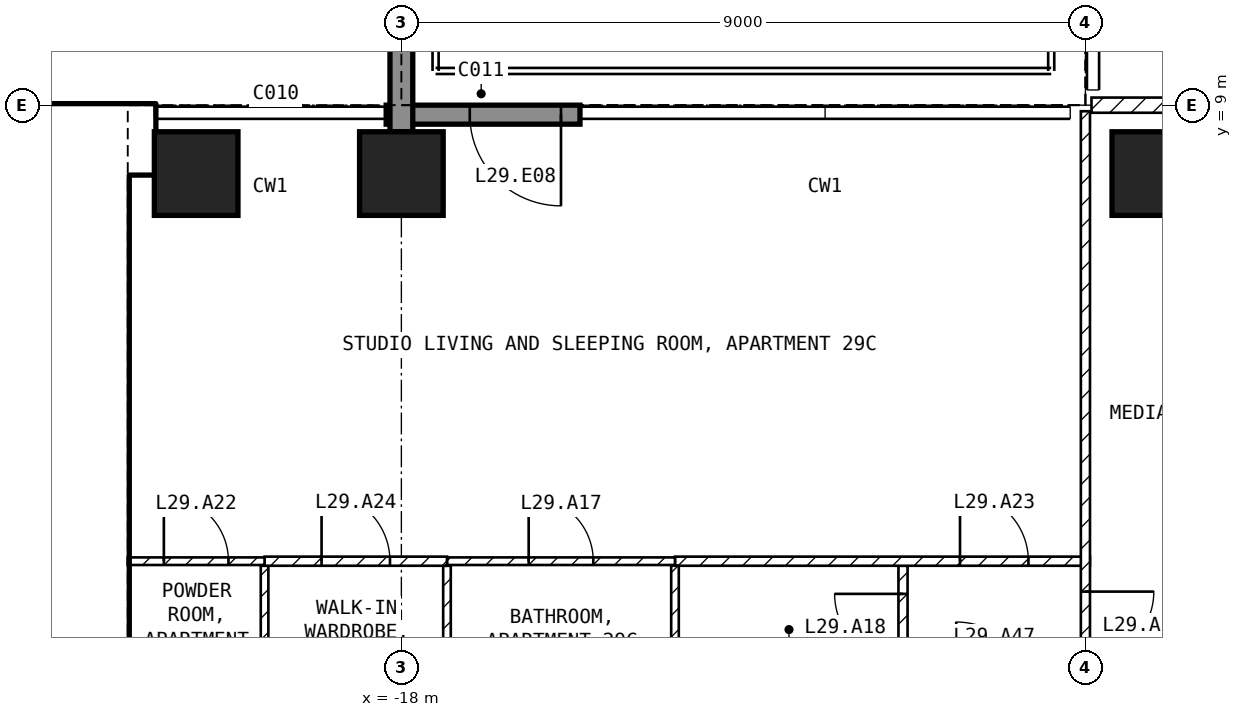
"""IFC4 building model, lengths in metres.
Left out: names, types, materials, properties, quantities, classifications, styles, units other than length and angle.
Written with IfcOpenShell. Run it as: python <this file> out.ifc"""

import sys

from ifc_helpers import new_model, si_unit, direction, frame, frame_2d, origin, origin_2d, place, context, subcontext, project, spatial, rectangle, extrude, element, fill, save


model = new_model("IFC4")
c1 = context("Model", 3, precision=1e-05, world=origin(), true_north=direction((0.0, 1.0)))
c2 = subcontext(c1, "Body", "Model", "MODEL_VIEW")
j1 = project(units=[si_unit("LENGTHUNIT", "METRE"), si_unit("PLANEANGLEUNIT", "RADIAN")], contexts=[c1])
p1 = place(None, origin())
s1 = spatial("IfcSite", under=j1, at=p1, CompositionType="ELEMENT")
p2 = place(p1, origin())
s2 = spatial("IfcBuilding", under=s1, at=p2, CompositionType="ELEMENT")
p3 = place(p2, frame((0.0, 0.0, 123.4)))
s3 = spatial("IfcBuildingStorey", under=s2, at=p3, CompositionType="ELEMENT", Elevation=123.4)
for number, where, z_axis, x_axis in (
    (1, (-20.7, 8.1, -0.25), (0.0, 0.0, 1.0), (1.0, 0.0, 0.0)),
    (2, (-18.0, 8.1, -0.25), (0.0, 0.0, 1.0), (1.0, 0.0, 0.0)),
    (3, (-8.1, 8.1, -0.25), (0.0, 0.0, 1.0), (1.0, 0.0, 0.0)),
):
    element("IfcColumn", number, at=place(p3, frame(where, z_axis=z_axis, x_axis=x_axis)), inside=s3, PredefinedType="COLUMN", context=c2, shape_type="SweptSolid", body=[
        extrude(rectangle(XDim=1.1, YDim=1.1, at=origin_2d()), origin(), (0.0, 0.0, 1.0), 3.5),
    ])
p4 = place(p3, frame((-15.65, 8.875, 0.0), z_axis=(0.0, 0.0, 1.0), x_axis=(-1.0, 0.0, 0.0)))
e4 = element("IfcWall", 4, at=p4, inside=s3, PredefinedType="SOLIDWALL", context=c2, shape_type="SweptSolid", body=[
    extrude(rectangle(XDim=2.55, YDim=0.25, at=frame_2d((1.275, 0.0))), origin(), (0.0, 0.0, 1.0), 3.25),
])
p5 = place(p4, frame((0.25, 0.0, 0.0)))
e5 = element("IfcOpeningElement", 5, at=p5, cuts=e4, PredefinedType="OPENING", context=c2, shape_type="SweptSolid", body=[
    extrude(rectangle(XDim=1.2, YDim=2.4, at=frame_2d((0.6, 1.2))), frame((0.0, 0.135, 0.0), z_axis=(0.0, -1.0, 0.0), x_axis=(1.0, 0.0, 0.0)), (0.0, 0.0, 1.0), 0.27),
])
p6 = place(p3, frame((-18.0, 8.65, 0.0), z_axis=(0.0, 0.0, 1.0), x_axis=(0.0, 1.0, 0.0)))
e6 = element("IfcWall", 6, at=p6, inside=s3, PredefinedType="SOLIDWALL", context=c2, shape_type="SweptSolid", body=[
    extrude(rectangle(XDim=3.09, YDim=0.3, at=frame_2d((1.545, 0.0))), origin(), (0.0, 0.0, 1.0), 3.25),
])
p7 = place(p3, frame((-29.45, 8.55, 0.0), z_axis=(0.0, 0.0, 1.0), x_axis=(1.0, 0.0, 0.0)))
e7 = element("IfcWall", 7, at=p7, inside=s3, PredefinedType="SHEAR", context=c2, shape_type="SweptSolid", body=[
    extrude(rectangle(XDim=8.2, YDim=0.9, at=frame_2d((4.1, 0.0))), origin(), (0.0, 0.0, 1.0), 3.25),
])
p8 = place(p3, frame((-21.825, 1.2, 0.0), z_axis=(0.0, 0.0, 1.0), x_axis=(0.0, 1.0, 0.0)))
e8 = element("IfcWall", 8, at=p8, inside=s3, PredefinedType="SHEAR", context=c2, shape_type="SweptSolid", body=[
    extrude(rectangle(XDim=6.9, YDim=0.45, at=frame_2d((3.45, 0.0))), origin(), (0.0, 0.0, 1.0), 3.25),
])
p9 = place(p3, frame((-28.35, 5.15, 0.0), z_axis=(0.0, 0.0, 1.0), x_axis=(1.0, 0.0, 0.0)))
e9 = element("IfcWall", 9, at=p9, inside=s3, PredefinedType="SOLIDWALL", context=c2, shape_type="SweptSolid", body=[
    extrude(rectangle(XDim=6.3, YDim=0.2, at=frame_2d((3.15, 0.0))), origin(), (0.0, 0.0, 1.0), 3.25),
])
p10 = place(p9, frame((5.1, 0.0, 0.0)))
e10 = element("IfcOpeningElement", 10, at=p10, cuts=e9, PredefinedType="OPENING", context=c2, shape_type="SweptSolid", body=[
    extrude(rectangle(XDim=1.0, YDim=2.1, at=frame_2d((0.5, 1.05))), frame((0.0, 0.11, 0.0), z_axis=(0.0, -1.0, 0.0), x_axis=(1.0, 0.0, 0.0)), (0.0, 0.0, 1.0), 0.22),
])
p11 = place(p3, frame((-8.92, 9.0, 0.0), z_axis=(0.0, 0.0, 1.0), x_axis=(1.0, 0.0, 0.0)))
e11 = element("IfcWall", 11, at=p11, inside=s3, PredefinedType="PARTITIONING", context=c2, shape_type="SweptSolid", body=[
    extrude(rectangle(XDim=17.84, YDim=0.2, at=frame_2d((8.92, 0.0))), origin(), (0.0, 0.0, 1.0), 3.25),
])
p12 = place(p11, frame((8.42, 0.0, 0.0)))
e12 = element("IfcOpeningElement", 12, at=p12, cuts=e11, PredefinedType="OPENING", context=c2, shape_type="SweptSolid", body=[
    extrude(rectangle(XDim=1.0, YDim=2.1, at=frame_2d((0.5, 1.05))), frame((0.0, 0.11, 0.0), z_axis=(0.0, -1.0, 0.0), x_axis=(1.0, 0.0, 0.0)), (0.0, 0.0, 1.0), 0.22),
])
p13 = place(p3, frame((-11.4, 1.3, 0.0), z_axis=(0.0, 0.0, 1.0), x_axis=(0.0, 1.0, 0.0)))
e13 = element("IfcWall", 13, at=p13, inside=s3, PredefinedType="PARTITIONING", context=c2, shape_type="SweptSolid", body=[
    extrude(rectangle(XDim=1.64, YDim=0.12, at=frame_2d((0.82, 0.0))), origin(), (0.0, 0.0, 1.0), 3.25),
])
p14 = place(p13, frame((0.37, 0.0, 0.0)))
e14 = element("IfcOpeningElement", 14, at=p14, cuts=e13, PredefinedType="OPENING", context=c2, shape_type="SweptSolid", body=[
    extrude(rectangle(XDim=0.9, YDim=2.1, at=frame_2d((0.45, 1.05))), frame((0.0, 0.07, 0.0), z_axis=(0.0, -1.0, 0.0), x_axis=(1.0, 0.0, 0.0)), (0.0, 0.0, 1.0), 0.14),
])
p15 = place(p3, frame((-14.4, 3.0, 0.0), z_axis=(0.0, 0.0, 1.0), x_axis=(1.0, 0.0, 0.0)))
e15 = element("IfcWall", 15, at=p15, inside=s3, PredefinedType="PARTITIONING", context=c2, shape_type="SweptSolid", body=[
    extrude(rectangle(XDim=5.46, YDim=0.12, at=frame_2d((2.73, 0.0))), origin(), (0.0, 0.0, 1.0), 3.25),
])
p16 = place(p15, frame((3.75, 0.0, 0.0)))
e16 = element("IfcOpeningElement", 16, at=p16, cuts=e15, PredefinedType="OPENING", context=c2, shape_type="SweptSolid", body=[
    extrude(rectangle(XDim=0.9, YDim=2.1, at=frame_2d((0.45, 1.05))), frame((0.0, 0.07, 0.0), z_axis=(0.0, -1.0, 0.0), x_axis=(1.0, 0.0, 0.0)), (0.0, 0.0, 1.0), 0.14),
])
p17 = place(p3, frame((-9.0, 8.92, 0.0), z_axis=(0.0, 0.0, 1.0), x_axis=(0.0, -1.0, 0.0)))
e17 = element("IfcWall", 17, at=p17, inside=s3, PredefinedType="PARTITIONING", context=c2, shape_type="SweptSolid", body=[
    extrude(rectangle(XDim=7.62, YDim=0.12, at=frame_2d((3.81, 0.0))), origin(), (0.0, 0.0, 1.0), 3.25),
])
p18 = place(p17, frame((6.32, 0.0, 0.0)))
e18 = element("IfcOpeningElement", 18, at=p18, cuts=e17, PredefinedType="OPENING", context=c2, shape_type="SweptSolid", body=[
    extrude(rectangle(XDim=0.9, YDim=2.1, at=frame_2d((0.45, 1.05))), frame((0.0, 0.07, 0.0), z_axis=(0.0, -1.0, 0.0), x_axis=(1.0, 0.0, 0.0)), (0.0, 0.0, 1.0), 0.14),
])
for number, where, z_axis, x_axis in (
    (19, (-14.4, 1.3, 0.0), (0.0, 0.0, 1.0), (0.0, 1.0, 0.0)),
    (20, (-17.4, 1.3, 0.0), (0.0, 0.0, 1.0), (0.0, 1.0, 0.0)),
):
    element("IfcWall", number, at=place(p3, frame(where, z_axis=z_axis, x_axis=x_axis)), inside=s3, PredefinedType="PARTITIONING", context=c2, shape_type="SweptSolid", body=[
        extrude(rectangle(XDim=1.64, YDim=0.1, at=frame_2d((0.82, 0.0))), origin(), (0.0, 0.0, 1.0), 3.25),
    ])
p19 = place(p3, frame((-17.4, 3.0, 0.0), z_axis=(0.0, 0.0, 1.0), x_axis=(1.0, 0.0, 0.0)))
e21 = element("IfcWall", 21, at=p19, inside=s3, PredefinedType="PARTITIONING", context=c2, shape_type="SweptSolid", body=[
    extrude(rectangle(XDim=3.0, YDim=0.1, at=frame_2d((1.5, 0.0))), origin(), (0.0, 0.0, 1.0), 3.25),
])
p20 = place(p19, frame((1.075, 0.0, 0.0)))
e22 = element("IfcOpeningElement", 22, at=p20, cuts=e21, PredefinedType="OPENING", context=c2, shape_type="SweptSolid", body=[
    extrude(rectangle(XDim=0.85, YDim=2.1, at=frame_2d((0.425, 1.05))), frame((0.0, 0.06, 0.0), z_axis=(0.0, -1.0, 0.0), x_axis=(1.0, 0.0, 0.0)), (0.0, 0.0, 1.0), 0.12),
])
p21 = place(p3, frame((-19.8, 1.3, 0.0), z_axis=(0.0, 0.0, 1.0), x_axis=(0.0, 1.0, 0.0)))
e23 = element("IfcWall", 23, at=p21, inside=s3, PredefinedType="PARTITIONING", context=c2, shape_type="SweptSolid", body=[
    extrude(rectangle(XDim=1.64, YDim=0.1, at=frame_2d((0.82, 0.0))), origin(), (0.0, 0.0, 1.0), 3.25),
])
p22 = place(p3, frame((-19.8, 3.0, 0.0), z_axis=(0.0, 0.0, 1.0), x_axis=(1.0, 0.0, 0.0)))
e24 = element("IfcWall", 24, at=p22, inside=s3, PredefinedType="PARTITIONING", context=c2, shape_type="SweptSolid", body=[
    extrude(rectangle(XDim=2.4, YDim=0.12, at=frame_2d((1.2, 0.0))), origin(), (0.0, 0.0, 1.0), 3.25),
])
p23 = place(p22, frame((0.75, 0.0, 0.0)))
e25 = element("IfcOpeningElement", 25, at=p23, cuts=e24, PredefinedType="OPENING", context=c2, shape_type="SweptSolid", body=[
    extrude(rectangle(XDim=0.9, YDim=2.1, at=frame_2d((0.45, 1.05))), frame((0.0, 0.07, 0.0), z_axis=(0.0, -1.0, 0.0), x_axis=(1.0, 0.0, 0.0)), (0.0, 0.0, 1.0), 0.14),
])
p24 = place(p3, frame((-21.6, 3.0, 0.0), z_axis=(0.0, 0.0, 1.0), x_axis=(1.0, 0.0, 0.0)))
e26 = element("IfcWall", 26, at=p24, inside=s3, PredefinedType="PARTITIONING", context=c2, shape_type="SweptSolid", body=[
    extrude(rectangle(XDim=1.8, YDim=0.1, at=frame_2d((0.9, 0.0))), origin(), (0.0, 0.0, 1.0), 3.25),
])
p25 = place(p24, frame((0.475, 0.0, 0.0)))
e27 = element("IfcOpeningElement", 27, at=p25, cuts=e26, PredefinedType="OPENING", context=c2, shape_type="SweptSolid", body=[
    extrude(rectangle(XDim=0.85, YDim=2.1, at=frame_2d((0.425, 1.05))), frame((0.0, 0.06, 0.0), z_axis=(0.0, -1.0, 0.0), x_axis=(1.0, 0.0, 0.0)), (0.0, 0.0, 1.0), 0.12),
])
p26 = place(p5, origin())
e28 = element("IfcDoor", 28, at=p26, inside=s3, OperationType="SINGLE_SWING_LEFT", PredefinedType="DOOR", context=c2, shape_type="SweptSolid", body=[
    extrude(rectangle(XDim=1.2, YDim=2.4, at=frame_2d((0.6, 1.2))), frame((0.0, 0.025, 0.0), z_axis=(0.0, -1.0, 0.0), x_axis=(1.0, 0.0, 0.0)), (0.0, 0.0, 1.0), 0.05),
])
fill(e5, e28)
p27 = place(p10, origin())
e29 = element("IfcDoor", 29, at=p27, inside=s3, OperationType="SINGLE_SWING_LEFT", PredefinedType="DOOR", context=c2, shape_type="SweptSolid", body=[
    extrude(rectangle(XDim=1.0, YDim=2.1, at=frame_2d((0.5, 1.05))), frame((0.0, 0.025, 0.0), z_axis=(0.0, -1.0, 0.0), x_axis=(1.0, 0.0, 0.0)), (0.0, 0.0, 1.0), 0.05),
])
fill(e10, e29)
p28 = place(p20, origin())
e30 = element("IfcDoor", 30, at=p28, inside=s3, OperationType="SINGLE_SWING_LEFT", PredefinedType="DOOR", context=c2, shape_type="SweptSolid", body=[
    extrude(rectangle(XDim=0.85, YDim=2.1, at=frame_2d((0.425, 1.05))), frame((0.0, 0.025, 0.0), z_axis=(0.0, -1.0, 0.0), x_axis=(1.0, 0.0, 0.0)), (0.0, 0.0, 1.0), 0.05),
])
fill(e22, e30)
p29 = place(p14, origin())
e31 = element("IfcDoor", 31, at=p29, inside=s3, OperationType="SINGLE_SWING_RIGHT", PredefinedType="DOOR", context=c2, shape_type="SweptSolid", body=[
    extrude(rectangle(XDim=0.9, YDim=2.1, at=frame_2d((0.45, 1.05))), frame((0.0, 0.025, 0.0), z_axis=(0.0, -1.0, 0.0), x_axis=(1.0, 0.0, 0.0)), (0.0, 0.0, 1.0), 0.05),
])
fill(e14, e31)
p30 = place(p18, origin())
e32 = element("IfcDoor", 32, at=p30, inside=s3, OperationType="SINGLE_SWING_LEFT", PredefinedType="DOOR", context=c2, shape_type="SweptSolid", body=[
    extrude(rectangle(XDim=0.9, YDim=2.1, at=frame_2d((0.45, 1.05))), frame((0.0, 0.025, 0.0), z_axis=(0.0, -1.0, 0.0), x_axis=(1.0, 0.0, 0.0)), (0.0, 0.0, 1.0), 0.05),
])
fill(e18, e32)
p31 = place(p25, origin())
e33 = element("IfcDoor", 33, at=p31, inside=s3, OperationType="SINGLE_SWING_LEFT", PredefinedType="DOOR", context=c2, shape_type="SweptSolid", body=[
    extrude(rectangle(XDim=0.85, YDim=2.1, at=frame_2d((0.425, 1.05))), frame((0.0, 0.025, 0.0), z_axis=(0.0, -1.0, 0.0), x_axis=(1.0, 0.0, 0.0)), (0.0, 0.0, 1.0), 0.05),
])
fill(e27, e33)
p32 = place(p16, origin())
e34 = element("IfcDoor", 34, at=p32, inside=s3, OperationType="SINGLE_SWING_LEFT", PredefinedType="DOOR", context=c2, shape_type="SweptSolid", body=[
    extrude(rectangle(XDim=0.9, YDim=2.1, at=frame_2d((0.45, 1.05))), frame((0.0, 0.025, 0.0), z_axis=(0.0, -1.0, 0.0), x_axis=(1.0, 0.0, 0.0)), (0.0, 0.0, 1.0), 0.05),
])
fill(e16, e34)
p33 = place(p23, origin())
e35 = element("IfcDoor", 35, at=p33, inside=s3, OperationType="SINGLE_SWING_LEFT", PredefinedType="DOOR", context=c2, shape_type="SweptSolid", body=[
    extrude(rectangle(XDim=0.9, YDim=2.1, at=frame_2d((0.45, 1.05))), frame((0.0, 0.025, 0.0), z_axis=(0.0, -1.0, 0.0), x_axis=(1.0, 0.0, 0.0)), (0.0, 0.0, 1.0), 0.05),
])
fill(e25, e35)
save(model, sys.argv[1])
